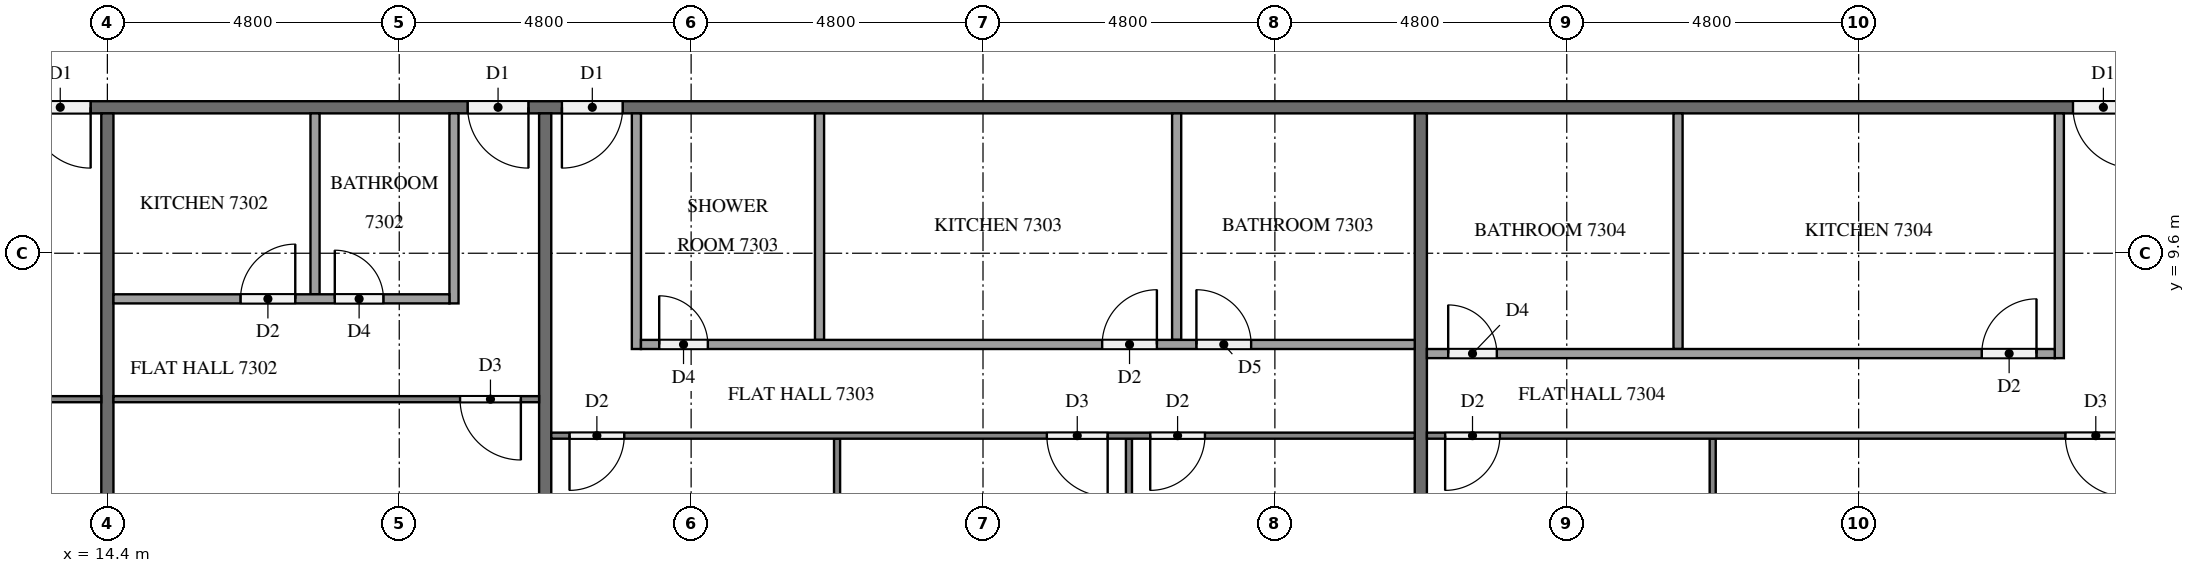
"""IFC4 building model, lengths in metres.
Left out: names, types, materials, properties, quantities, classifications, styles, units other than length and angle.
Written with IfcOpenShell. Run it as: python <this file> out.ifc"""

import sys

from ifc_helpers import new_model, si_unit, direction, frame, frame_2d, origin, place, context, subcontext, project, spatial, rectangle, extrude, element, fill, save


model = new_model("IFC4")
c1 = context("Model", 3, precision=1e-05, world=origin(), true_north=direction((0.0, 1.0)))
c2 = subcontext(c1, "Body", "Model", "MODEL_VIEW")
j1 = project(units=[si_unit("LENGTHUNIT", "METRE"), si_unit("PLANEANGLEUNIT", "RADIAN")], contexts=[c1])
p1 = place(None, origin())
s1 = spatial("IfcSite", under=j1, at=p1, CompositionType="ELEMENT")
p2 = place(p1, origin())
s2 = spatial("IfcBuilding", under=s1, at=p2, CompositionType="ELEMENT")
p3 = place(p2, frame((0.0, 0.0, 279.1)))
s3 = spatial("IfcBuildingStorey", under=s2, at=p3, CompositionType="ELEMENT", Elevation=279.1)
p4 = place(p3, frame((50.5, 12.0, 0.0), z_axis=(0.0, 0.0, 1.0), x_axis=(-1.0, 0.0, 0.0)))
e1 = element("IfcWall", 1, at=p4, inside=s3, PredefinedType="PARTITIONING", context=c2, shape_type="SweptSolid", body=[
    extrude(rectangle(XDim=38.6, YDim=0.2, at=frame_2d((19.3, 0.0))), origin(), (0.0, 0.0, 1.0), 3.2),
])
p5 = place(p4, frame((36.375, 0.0, 0.0)))
e2 = element("IfcOpeningElement", 2, at=p5, cuts=e1, PredefinedType="OPENING", context=c2, shape_type="SweptSolid", body=[
    extrude(rectangle(XDim=1.0, YDim=2.1, at=frame_2d((0.5, 1.05))), frame((0.0, 0.11, 0.0), z_axis=(0.0, -1.0, 0.0), x_axis=(1.0, 0.0, 0.0)), (0.0, 0.0, 1.0), 0.22),
])
p6 = place(p4, frame((29.175, 0.0, 0.0)))
e3 = element("IfcOpeningElement", 3, at=p6, cuts=e1, PredefinedType="OPENING", context=c2, shape_type="SweptSolid", body=[
    extrude(rectangle(XDim=1.0, YDim=2.1, at=frame_2d((0.5, 1.05))), frame((0.0, 0.11, 0.0), z_axis=(0.0, -1.0, 0.0), x_axis=(1.0, 0.0, 0.0)), (0.0, 0.0, 1.0), 0.22),
])
p7 = place(p4, frame((27.625, 0.0, 0.0)))
e4 = element("IfcOpeningElement", 4, at=p7, cuts=e1, PredefinedType="OPENING", context=c2, shape_type="SweptSolid", body=[
    extrude(rectangle(XDim=1.0, YDim=2.1, at=frame_2d((0.5, 1.05))), frame((0.0, 0.11, 0.0), z_axis=(0.0, -1.0, 0.0), x_axis=(1.0, 0.0, 0.0)), (0.0, 0.0, 1.0), 0.22),
])
p8 = place(p4, frame((2.775, 0.0, 0.0)))
e5 = element("IfcOpeningElement", 5, at=p8, cuts=e1, PredefinedType="OPENING", context=c2, shape_type="SweptSolid", body=[
    extrude(rectangle(XDim=1.0, YDim=2.1, at=frame_2d((0.5, 1.05))), frame((0.0, 0.11, 0.0), z_axis=(0.0, -1.0, 0.0), x_axis=(1.0, 0.0, 0.0)), (0.0, 0.0, 1.0), 0.22),
])
p9 = place(p4, frame((1.225, 0.0, 0.0)))
e6 = element("IfcOpeningElement", 6, at=p9, cuts=e1, PredefinedType="OPENING", context=c2, shape_type="SweptSolid", body=[
    extrude(rectangle(XDim=1.0, YDim=2.1, at=frame_2d((0.5, 1.05))), frame((0.0, 0.11, 0.0), z_axis=(0.0, -1.0, 0.0), x_axis=(1.0, 0.0, 0.0)), (0.0, 0.0, 1.0), 0.22),
])
p10 = place(p3, frame((14.4, 11.9, 0.0), z_axis=(0.0, 0.0, 1.0), x_axis=(0.0, -1.0, 0.0)))
e7 = element("IfcWall", 7, at=p10, inside=s3, PredefinedType="PARTITIONING", context=c2, shape_type="SweptSolid", body=[
    extrude(rectangle(XDim=11.65, YDim=0.2, at=frame_2d((5.825, 0.0))), origin(), (0.0, 0.0, 1.0), 3.2),
])
for number, where, z_axis, x_axis in (
    (8, (21.6, 11.9, 0.0), (0.0, 0.0, 1.0), (0.0, -1.0, 0.0)),
    (9, (36.0, 11.9, 0.0), (0.0, 0.0, 1.0), (0.0, -1.0, 0.0)),
):
    element("IfcWall", number, at=place(p3, frame(where, z_axis=z_axis, x_axis=x_axis)), inside=s3, PredefinedType="PARTITIONING", context=c2, shape_type="SweptSolid", body=[
        extrude(rectangle(XDim=11.8, YDim=0.2, at=frame_2d((5.9, 0.0))), origin(), (0.0, 0.0, 1.0), 3.2),
    ])
p11 = place(p3, frame((14.3, 7.2, 0.0), z_axis=(0.0, 0.0, 1.0), x_axis=(-1.0, 0.0, 0.0)))
e10 = element("IfcWall", 10, at=p11, inside=s3, PredefinedType="PARTITIONING", context=c2, shape_type="SweptSolid", body=[
    extrude(rectangle(XDim=14.2, YDim=0.1, at=frame_2d((7.1, 0.0))), origin(), (0.0, 0.0, 1.0), 3.2),
])
p12 = place(p11, frame((3.45, 0.0, 0.0)))
e11 = element("IfcOpeningElement", 11, at=p12, cuts=e10, PredefinedType="OPENING", context=c2, shape_type="SweptSolid", body=[
    extrude(rectangle(XDim=0.9, YDim=2.1, at=frame_2d((0.45, 1.05))), frame((0.0, 0.06, 0.0), z_axis=(0.0, -1.0, 0.0), x_axis=(1.0, 0.0, 0.0)), (0.0, 0.0, 1.0), 0.12),
])
p13 = place(p11, frame((5.05, 0.0, 0.0)))
e12 = element("IfcOpeningElement", 12, at=p13, cuts=e10, PredefinedType="OPENING", context=c2, shape_type="SweptSolid", body=[
    extrude(rectangle(XDim=0.9, YDim=2.1, at=frame_2d((0.45, 1.05))), frame((0.0, 0.06, 0.0), z_axis=(0.0, -1.0, 0.0), x_axis=(1.0, 0.0, 0.0)), (0.0, 0.0, 1.0), 0.12),
])
p14 = place(p11, frame((12.9, 0.0, 0.0)))
e13 = element("IfcOpeningElement", 13, at=p14, cuts=e10, PredefinedType="OPENING", context=c2, shape_type="SweptSolid", body=[
    extrude(rectangle(XDim=1.0, YDim=2.1, at=frame_2d((0.5, 1.05))), frame((0.0, 0.06, 0.0), z_axis=(0.0, -1.0, 0.0), x_axis=(1.0, 0.0, 0.0)), (0.0, 0.0, 1.0), 0.12),
])
p15 = place(p3, frame((21.5, 7.2, 0.0), z_axis=(0.0, 0.0, 1.0), x_axis=(-1.0, 0.0, 0.0)))
e14 = element("IfcWall", 14, at=p15, inside=s3, PredefinedType="PARTITIONING", context=c2, shape_type="SweptSolid", body=[
    extrude(rectangle(XDim=7.0, YDim=0.1, at=frame_2d((3.5, 0.0))), origin(), (0.0, 0.0, 1.0), 3.2),
])
p16 = place(p15, frame((0.3, 0.0, 0.0)))
e15 = element("IfcOpeningElement", 15, at=p16, cuts=e14, PredefinedType="OPENING", context=c2, shape_type="SweptSolid", body=[
    extrude(rectangle(XDim=1.0, YDim=2.1, at=frame_2d((0.5, 1.05))), frame((0.0, 0.06, 0.0), z_axis=(0.0, -1.0, 0.0), x_axis=(1.0, 0.0, 0.0)), (0.0, 0.0, 1.0), 0.12),
])
p17 = place(p3, frame((17.815, 11.9, 0.0), z_axis=(0.0, 0.0, 1.0), x_axis=(0.0, -1.0, 0.0)))
e16 = element("IfcWall", 16, at=p17, inside=s3, PredefinedType="PARTITIONING", context=c2, shape_type="SweptSolid", body=[
    extrude(rectangle(XDim=2.975, YDim=0.15, at=frame_2d((1.487, 0.0))), origin(), (0.0, 0.0, 1.0), 3.2),
])
p18 = place(p3, frame((20.1, 11.9, 0.0), z_axis=(0.0, 0.0, 1.0), x_axis=(0.0, -1.0, 0.0)))
e17 = element("IfcWall", 17, at=p18, inside=s3, PredefinedType="PARTITIONING", context=c2, shape_type="SweptSolid", body=[
    extrude(rectangle(XDim=3.125, YDim=0.15, at=frame_2d((1.562, 0.0))), origin(), (0.0, 0.0, 1.0), 3.2),
])
p19 = place(p3, frame((14.5, 8.85, 0.0), z_axis=(0.0, 0.0, 1.0), x_axis=(1.0, 0.0, 0.0)))
e18 = element("IfcWall", 18, at=p19, inside=s3, PredefinedType="PARTITIONING", context=c2, shape_type="SweptSolid", body=[
    extrude(rectangle(XDim=5.525, YDim=0.15, at=frame_2d((2.762, 0.0))), origin(), (0.0, 0.0, 1.0), 3.2),
])
p20 = place(p19, frame((3.64, 0.0, 0.0)))
e19 = element("IfcOpeningElement", 19, at=p20, cuts=e18, PredefinedType="OPENING", context=c2, shape_type="SweptSolid", body=[
    extrude(rectangle(XDim=0.8, YDim=2.1, at=frame_2d((0.4, 1.05))), frame((0.0, 0.085, 0.0), z_axis=(0.0, -1.0, 0.0), x_axis=(1.0, 0.0, 0.0)), (0.0, 0.0, 1.0), 0.17),
])
p21 = place(p19, frame((2.09, 0.0, 0.0)))
e20 = element("IfcOpeningElement", 20, at=p21, cuts=e18, PredefinedType="OPENING", context=c2, shape_type="SweptSolid", body=[
    extrude(rectangle(XDim=0.9, YDim=2.1, at=frame_2d((0.45, 1.05))), frame((0.0, 0.085, 0.0), z_axis=(0.0, -1.0, 0.0), x_axis=(1.0, 0.0, 0.0)), (0.0, 0.0, 1.0), 0.17),
])
for number, where, z_axis, x_axis in (
    (21, (26.4, 6.55, 0.0), (0.0, 0.0, 1.0), (0.0, -1.0, 0.0)),
    (22, (31.2, 6.55, 0.0), (0.0, 0.0, 1.0), (0.0, -1.0, 0.0)),
):
    element("IfcWall", number, at=place(p3, frame(where, z_axis=z_axis, x_axis=x_axis)), inside=s3, PredefinedType="PARTITIONING", context=c2, shape_type="SweptSolid", body=[
        extrude(rectangle(XDim=6.45, YDim=0.1, at=frame_2d((3.225, 0.0))), origin(), (0.0, 0.0, 1.0), 3.2),
    ])
p22 = place(p3, frame((35.9, 6.6, 0.0), z_axis=(0.0, 0.0, 1.0), x_axis=(-1.0, 0.0, 0.0)))
e23 = element("IfcWall", 23, at=p22, inside=s3, PredefinedType="PARTITIONING", context=c2, shape_type="SweptSolid", body=[
    extrude(rectangle(XDim=14.2, YDim=0.1, at=frame_2d((7.1, 0.0))), origin(), (0.0, 0.0, 1.0), 3.2),
])
p23 = place(p22, frame((13.0, 0.0, 0.0)))
e24 = element("IfcOpeningElement", 24, at=p23, cuts=e23, PredefinedType="OPENING", context=c2, shape_type="SweptSolid", body=[
    extrude(rectangle(XDim=0.9, YDim=2.1, at=frame_2d((0.45, 1.05))), frame((0.0, 0.06, 0.0), z_axis=(0.0, -1.0, 0.0), x_axis=(1.0, 0.0, 0.0)), (0.0, 0.0, 1.0), 0.12),
])
p24 = place(p22, frame((5.05, 0.0, 0.0)))
e25 = element("IfcOpeningElement", 25, at=p24, cuts=e23, PredefinedType="OPENING", context=c2, shape_type="SweptSolid", body=[
    extrude(rectangle(XDim=1.0, YDim=2.1, at=frame_2d((0.5, 1.05))), frame((0.0, 0.06, 0.0), z_axis=(0.0, -1.0, 0.0), x_axis=(1.0, 0.0, 0.0)), (0.0, 0.0, 1.0), 0.12),
])
p25 = place(p22, frame((3.45, 0.0, 0.0)))
e26 = element("IfcOpeningElement", 26, at=p25, cuts=e23, PredefinedType="OPENING", context=c2, shape_type="SweptSolid", body=[
    extrude(rectangle(XDim=0.9, YDim=2.1, at=frame_2d((0.45, 1.05))), frame((0.0, 0.06, 0.0), z_axis=(0.0, -1.0, 0.0), x_axis=(1.0, 0.0, 0.0)), (0.0, 0.0, 1.0), 0.12),
])
for number, where, z_axis, x_axis in (
    (27, (26.112, 11.9, 0.0), (0.0, 0.0, 1.0), (0.0, -1.0, 0.0)),
    (28, (31.985, 11.9, 0.0), (0.0, 0.0, 1.0), (0.0, -1.0, 0.0)),
):
    element("IfcWall", number, at=place(p3, frame(where, z_axis=z_axis, x_axis=x_axis)), inside=s3, PredefinedType="PARTITIONING", context=c2, shape_type="SweptSolid", body=[
        extrude(rectangle(XDim=3.725, YDim=0.15, at=frame_2d((1.862, 0.0))), origin(), (0.0, 0.0, 1.0), 3.2),
    ])
p26 = place(p3, frame((23.1, 11.9, 0.0), z_axis=(0.0, 0.0, 1.0), x_axis=(0.0, -1.0, 0.0)))
e29 = element("IfcWall", 29, at=p26, inside=s3, PredefinedType="PARTITIONING", context=c2, shape_type="SweptSolid", body=[
    extrude(rectangle(XDim=3.875, YDim=0.15, at=frame_2d((1.938, 0.0))), origin(), (0.0, 0.0, 1.0), 3.2),
])
p27 = place(p3, frame((23.175, 8.1, 0.0), z_axis=(0.0, 0.0, 1.0), x_axis=(1.0, 0.0, 0.0)))
e30 = element("IfcWall", 30, at=p27, inside=s3, PredefinedType="PARTITIONING", context=c2, shape_type="SweptSolid", body=[
    extrude(rectangle(XDim=12.725, YDim=0.15, at=frame_2d((6.362, 0.0))), origin(), (0.0, 0.0, 1.0), 3.2),
])
p28 = place(p27, frame((0.3, 0.0, 0.0)))
e31 = element("IfcOpeningElement", 31, at=p28, cuts=e30, PredefinedType="OPENING", context=c2, shape_type="SweptSolid", body=[
    extrude(rectangle(XDim=0.8, YDim=2.1, at=frame_2d((0.4, 1.05))), frame((0.0, 0.085, 0.0), z_axis=(0.0, -1.0, 0.0), x_axis=(1.0, 0.0, 0.0)), (0.0, 0.0, 1.0), 0.17),
])
p29 = place(p27, frame((7.585, 0.0, 0.0)))
e32 = element("IfcOpeningElement", 32, at=p29, cuts=e30, PredefinedType="OPENING", context=c2, shape_type="SweptSolid", body=[
    extrude(rectangle(XDim=0.9, YDim=2.1, at=frame_2d((0.45, 1.05))), frame((0.0, 0.085, 0.0), z_axis=(0.0, -1.0, 0.0), x_axis=(1.0, 0.0, 0.0)), (0.0, 0.0, 1.0), 0.17),
])
p30 = place(p27, frame((9.135, 0.0, 0.0)))
e33 = element("IfcOpeningElement", 33, at=p30, cuts=e30, PredefinedType="OPENING", context=c2, shape_type="SweptSolid", body=[
    extrude(rectangle(XDim=0.9, YDim=2.1, at=frame_2d((0.45, 1.05))), frame((0.0, 0.085, 0.0), z_axis=(0.0, -1.0, 0.0), x_axis=(1.0, 0.0, 0.0)), (0.0, 0.0, 1.0), 0.17),
])
p31 = place(p3, frame((40.8, 6.55, 0.0), z_axis=(0.0, 0.0, 1.0), x_axis=(0.0, -1.0, 0.0)))
e34 = element("IfcWall", 34, at=p31, inside=s3, PredefinedType="PARTITIONING", context=c2, shape_type="SweptSolid", body=[
    extrude(rectangle(XDim=6.45, YDim=0.1, at=frame_2d((3.225, 0.0))), origin(), (0.0, 0.0, 1.0), 3.2),
])
p32 = place(p3, frame((47.9, 6.6, 0.0), z_axis=(0.0, 0.0, 1.0), x_axis=(-1.0, 0.0, 0.0)))
e35 = element("IfcWall", 35, at=p32, inside=s3, PredefinedType="PARTITIONING", context=c2, shape_type="SweptSolid", body=[
    extrude(rectangle(XDim=11.8, YDim=0.1, at=frame_2d((5.9, 0.0))), origin(), (0.0, 0.0, 1.0), 3.2),
])
p33 = place(p32, frame((0.3, 0.0, 0.0)))
e36 = element("IfcOpeningElement", 36, at=p33, cuts=e35, PredefinedType="OPENING", context=c2, shape_type="SweptSolid", body=[
    extrude(rectangle(XDim=1.0, YDim=2.1, at=frame_2d((0.5, 1.05))), frame((0.0, 0.06, 0.0), z_axis=(0.0, -1.0, 0.0), x_axis=(1.0, 0.0, 0.0)), (0.0, 0.0, 1.0), 0.12),
])
p34 = place(p32, frame((10.6, 0.0, 0.0)))
e37 = element("IfcOpeningElement", 37, at=p34, cuts=e35, PredefinedType="OPENING", context=c2, shape_type="SweptSolid", body=[
    extrude(rectangle(XDim=0.9, YDim=2.1, at=frame_2d((0.45, 1.05))), frame((0.0, 0.06, 0.0), z_axis=(0.0, -1.0, 0.0), x_axis=(1.0, 0.0, 0.0)), (0.0, 0.0, 1.0), 0.12),
])
p35 = place(p3, frame((40.23, 11.9, 0.0), z_axis=(0.0, 0.0, 1.0), x_axis=(0.0, -1.0, 0.0)))
e38 = element("IfcWall", 38, at=p35, inside=s3, PredefinedType="PARTITIONING", context=c2, shape_type="SweptSolid", body=[
    extrude(rectangle(XDim=3.875, YDim=0.15, at=frame_2d((1.938, 0.0))), origin(), (0.0, 0.0, 1.0), 3.2),
])
p36 = place(p3, frame((46.5, 11.9, 0.0), z_axis=(0.0, 0.0, 1.0), x_axis=(0.0, -1.0, 0.0)))
e39 = element("IfcWall", 39, at=p36, inside=s3, PredefinedType="PARTITIONING", context=c2, shape_type="SweptSolid", body=[
    extrude(rectangle(XDim=4.025, YDim=0.15, at=frame_2d((2.012, 0.0))), origin(), (0.0, 0.0, 1.0), 3.2),
])
p37 = place(p3, frame((36.1, 7.95, 0.0), z_axis=(0.0, 0.0, 1.0), x_axis=(1.0, 0.0, 0.0)))
e40 = element("IfcWall", 40, at=p37, inside=s3, PredefinedType="PARTITIONING", context=c2, shape_type="SweptSolid", body=[
    extrude(rectangle(XDim=10.325, YDim=0.15, at=frame_2d((5.163, 0.0))), origin(), (0.0, 0.0, 1.0), 3.2),
])
p38 = place(p37, frame((9.125, 0.0, 0.0)))
e41 = element("IfcOpeningElement", 41, at=p38, cuts=e40, PredefinedType="OPENING", context=c2, shape_type="SweptSolid", body=[
    extrude(rectangle(XDim=0.9, YDim=2.1, at=frame_2d((0.45, 1.05))), frame((0.0, 0.085, 0.0), z_axis=(0.0, -1.0, 0.0), x_axis=(1.0, 0.0, 0.0)), (0.0, 0.0, 1.0), 0.17),
])
p39 = place(p37, frame((0.35, 0.0, 0.0)))
e42 = element("IfcOpeningElement", 42, at=p39, cuts=e40, PredefinedType="OPENING", context=c2, shape_type="SweptSolid", body=[
    extrude(rectangle(XDim=0.8, YDim=2.1, at=frame_2d((0.4, 1.05))), frame((0.0, 0.085, 0.0), z_axis=(0.0, -1.0, 0.0), x_axis=(1.0, 0.0, 0.0)), (0.0, 0.0, 1.0), 0.17),
])
p40 = place(p5, origin())
e43 = element("IfcDoor", 43, at=p40, inside=s3, OperationType="SINGLE_SWING_LEFT", PredefinedType="DOOR", context=c2, shape_type="SweptSolid", body=[
    extrude(rectangle(XDim=1.0, YDim=2.1, at=frame_2d((0.5, 1.05))), frame((0.0, 0.025, 0.0), z_axis=(0.0, -1.0, 0.0), x_axis=(1.0, 0.0, 0.0)), (0.0, 0.0, 1.0), 0.05),
])
fill(e2, e43)
p41 = place(p6, origin())
e44 = element("IfcDoor", 44, at=p41, inside=s3, OperationType="SINGLE_SWING_LEFT", PredefinedType="DOOR", context=c2, shape_type="SweptSolid", body=[
    extrude(rectangle(XDim=1.0, YDim=2.1, at=frame_2d((0.5, 1.05))), frame((0.0, 0.025, 0.0), z_axis=(0.0, -1.0, 0.0), x_axis=(1.0, 0.0, 0.0)), (0.0, 0.0, 1.0), 0.05),
])
fill(e3, e44)
p42 = place(p7, origin())
e45 = element("IfcDoor", 45, at=p42, inside=s3, OperationType="SINGLE_SWING_RIGHT", PredefinedType="DOOR", context=c2, shape_type="SweptSolid", body=[
    extrude(rectangle(XDim=1.0, YDim=2.1, at=frame_2d((0.5, 1.05))), frame((0.0, 0.025, 0.0), z_axis=(0.0, -1.0, 0.0), x_axis=(1.0, 0.0, 0.0)), (0.0, 0.0, 1.0), 0.05),
])
fill(e4, e45)
p43 = place(p8, origin())
e46 = element("IfcDoor", 46, at=p43, inside=s3, OperationType="SINGLE_SWING_LEFT", PredefinedType="DOOR", context=c2, shape_type="SweptSolid", body=[
    extrude(rectangle(XDim=1.0, YDim=2.1, at=frame_2d((0.5, 1.05))), frame((0.0, 0.025, 0.0), z_axis=(0.0, -1.0, 0.0), x_axis=(1.0, 0.0, 0.0)), (0.0, 0.0, 1.0), 0.05),
])
fill(e5, e46)
p44 = place(p16, origin())
e47 = element("IfcDoor", 47, at=p44, inside=s3, OperationType="SINGLE_SWING_LEFT", PredefinedType="DOOR", context=c2, shape_type="SweptSolid", body=[
    extrude(rectangle(XDim=1.0, YDim=2.1, at=frame_2d((0.5, 1.05))), frame((0.0, 0.025, 0.0), z_axis=(0.0, -1.0, 0.0), x_axis=(1.0, 0.0, 0.0)), (0.0, 0.0, 1.0), 0.05),
])
fill(e15, e47)
p45 = place(p20, origin())
e48 = element("IfcDoor", 48, at=p45, inside=s3, OperationType="SINGLE_SWING_LEFT", PredefinedType="DOOR", context=c2, shape_type="SweptSolid", body=[
    extrude(rectangle(XDim=0.8, YDim=2.1, at=frame_2d((0.4, 1.05))), frame((0.0, 0.025, 0.0), z_axis=(0.0, -1.0, 0.0), x_axis=(1.0, 0.0, 0.0)), (0.0, 0.0, 1.0), 0.05),
])
fill(e19, e48)
p46 = place(p21, origin())
e49 = element("IfcDoor", 49, at=p46, inside=s3, OperationType="SINGLE_SWING_RIGHT", PredefinedType="DOOR", context=c2, shape_type="SweptSolid", body=[
    extrude(rectangle(XDim=0.9, YDim=2.1, at=frame_2d((0.45, 1.05))), frame((0.0, 0.025, 0.0), z_axis=(0.0, -1.0, 0.0), x_axis=(1.0, 0.0, 0.0)), (0.0, 0.0, 1.0), 0.05),
])
fill(e20, e49)
p47 = place(p23, origin())
e50 = element("IfcDoor", 50, at=p47, inside=s3, OperationType="SINGLE_SWING_RIGHT", PredefinedType="DOOR", context=c2, shape_type="SweptSolid", body=[
    extrude(rectangle(XDim=0.9, YDim=2.1, at=frame_2d((0.45, 1.05))), frame((0.0, 0.025, 0.0), z_axis=(0.0, -1.0, 0.0), x_axis=(1.0, 0.0, 0.0)), (0.0, 0.0, 1.0), 0.05),
])
fill(e24, e50)
p48 = place(p24, origin())
e51 = element("IfcDoor", 51, at=p48, inside=s3, OperationType="SINGLE_SWING_LEFT", PredefinedType="DOOR", context=c2, shape_type="SweptSolid", body=[
    extrude(rectangle(XDim=1.0, YDim=2.1, at=frame_2d((0.5, 1.05))), frame((0.0, 0.025, 0.0), z_axis=(0.0, -1.0, 0.0), x_axis=(1.0, 0.0, 0.0)), (0.0, 0.0, 1.0), 0.05),
])
fill(e25, e51)
p49 = place(p25, origin())
e52 = element("IfcDoor", 52, at=p49, inside=s3, OperationType="SINGLE_SWING_RIGHT", PredefinedType="DOOR", context=c2, shape_type="SweptSolid", body=[
    extrude(rectangle(XDim=0.9, YDim=2.1, at=frame_2d((0.45, 1.05))), frame((0.0, 0.025, 0.0), z_axis=(0.0, -1.0, 0.0), x_axis=(1.0, 0.0, 0.0)), (0.0, 0.0, 1.0), 0.05),
])
fill(e26, e52)
p50 = place(p28, origin())
e53 = element("IfcDoor", 53, at=p50, inside=s3, OperationType="SINGLE_SWING_LEFT", PredefinedType="DOOR", context=c2, shape_type="SweptSolid", body=[
    extrude(rectangle(XDim=0.8, YDim=2.1, at=frame_2d((0.4, 1.05))), frame((0.0, 0.025, 0.0), z_axis=(0.0, -1.0, 0.0), x_axis=(1.0, 0.0, 0.0)), (0.0, 0.0, 1.0), 0.05),
])
fill(e31, e53)
p51 = place(p29, origin())
e54 = element("IfcDoor", 54, at=p51, inside=s3, OperationType="SINGLE_SWING_RIGHT", PredefinedType="DOOR", context=c2, shape_type="SweptSolid", body=[
    extrude(rectangle(XDim=0.9, YDim=2.1, at=frame_2d((0.45, 1.05))), frame((0.0, 0.025, 0.0), z_axis=(0.0, -1.0, 0.0), x_axis=(1.0, 0.0, 0.0)), (0.0, 0.0, 1.0), 0.05),
])
fill(e32, e54)
p52 = place(p30, origin())
e55 = element("IfcDoor", 55, at=p52, inside=s3, OperationType="SINGLE_SWING_LEFT", PredefinedType="DOOR", context=c2, shape_type="SweptSolid", body=[
    extrude(rectangle(XDim=0.9, YDim=2.1, at=frame_2d((0.45, 1.05))), frame((0.0, 0.025, 0.0), z_axis=(0.0, -1.0, 0.0), x_axis=(1.0, 0.0, 0.0)), (0.0, 0.0, 1.0), 0.05),
])
fill(e33, e55)
p53 = place(p33, origin())
e56 = element("IfcDoor", 56, at=p53, inside=s3, OperationType="SINGLE_SWING_LEFT", PredefinedType="DOOR", context=c2, shape_type="SweptSolid", body=[
    extrude(rectangle(XDim=1.0, YDim=2.1, at=frame_2d((0.5, 1.05))), frame((0.0, 0.025, 0.0), z_axis=(0.0, -1.0, 0.0), x_axis=(1.0, 0.0, 0.0)), (0.0, 0.0, 1.0), 0.05),
])
fill(e36, e56)
p54 = place(p34, origin())
e57 = element("IfcDoor", 57, at=p54, inside=s3, OperationType="SINGLE_SWING_RIGHT", PredefinedType="DOOR", context=c2, shape_type="SweptSolid", body=[
    extrude(rectangle(XDim=0.9, YDim=2.1, at=frame_2d((0.45, 1.05))), frame((0.0, 0.025, 0.0), z_axis=(0.0, -1.0, 0.0), x_axis=(1.0, 0.0, 0.0)), (0.0, 0.0, 1.0), 0.05),
])
fill(e37, e57)
p55 = place(p38, origin())
e58 = element("IfcDoor", 58, at=p55, inside=s3, OperationType="SINGLE_SWING_RIGHT", PredefinedType="DOOR", context=c2, shape_type="SweptSolid", body=[
    extrude(rectangle(XDim=0.9, YDim=2.1, at=frame_2d((0.45, 1.05))), frame((0.0, 0.025, 0.0), z_axis=(0.0, -1.0, 0.0), x_axis=(1.0, 0.0, 0.0)), (0.0, 0.0, 1.0), 0.05),
])
fill(e41, e58)
p56 = place(p39, origin())
e59 = element("IfcDoor", 59, at=p56, inside=s3, OperationType="SINGLE_SWING_LEFT", PredefinedType="DOOR", context=c2, shape_type="SweptSolid", body=[
    extrude(rectangle(XDim=0.8, YDim=2.1, at=frame_2d((0.4, 1.05))), frame((0.0, 0.025, 0.0), z_axis=(0.0, -1.0, 0.0), x_axis=(1.0, 0.0, 0.0)), (0.0, 0.0, 1.0), 0.05),
])
fill(e42, e59)
save(model, sys.argv[1])
